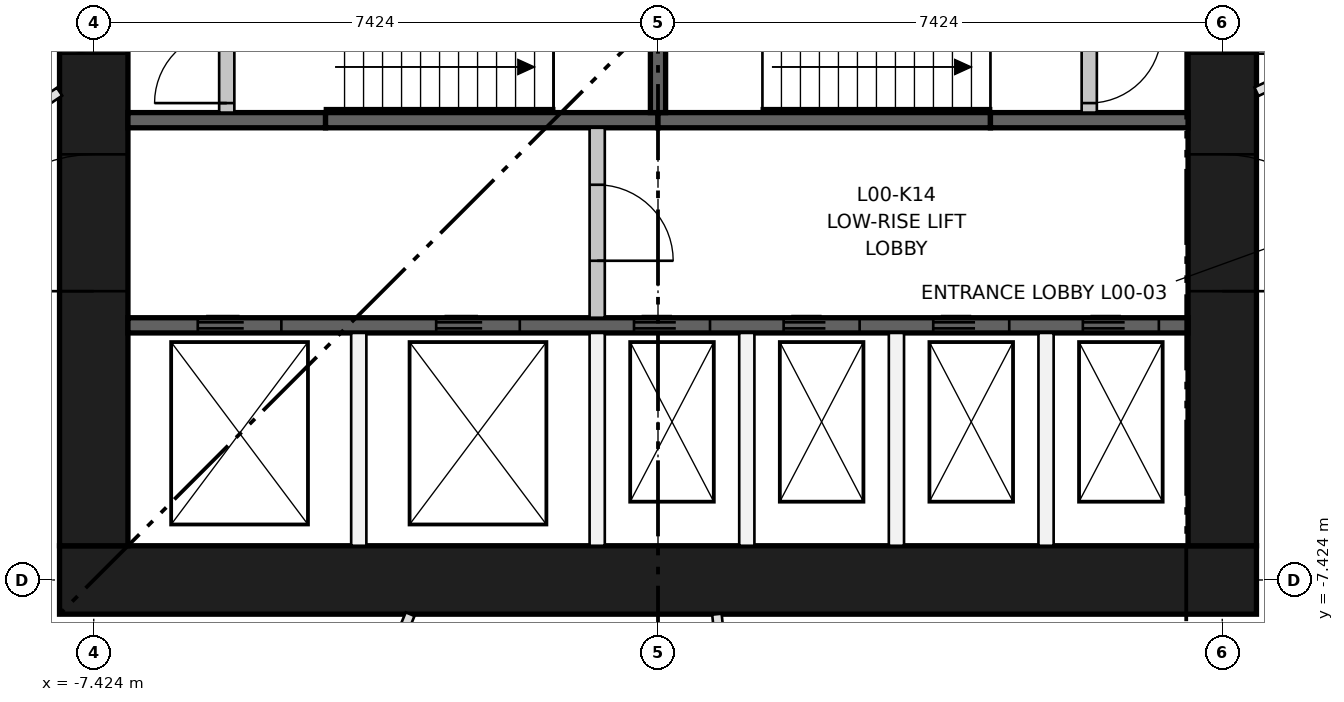
"""IFC4 building model, lengths in metres.
Left out: names, types, materials, properties, quantities, classifications, styles, units other than length and angle.
Written with IfcOpenShell. Run it as: python <this file> out.ifc"""

import sys

from ifc_helpers import new_model, si_unit, direction, frame, frame_2d, origin, place, context, subcontext, project, spatial, rectangle, extrude, element, fill, save


model = new_model("IFC4")
c1 = context("Model", 3, precision=1e-05, world=origin(), true_north=direction((0.0, 1.0)))
c2 = subcontext(c1, "Body", "Model", "MODEL_VIEW")
j1 = project(units=[si_unit("LENGTHUNIT", "METRE"), si_unit("PLANEANGLEUNIT", "RADIAN")], contexts=[c1])
p1 = place(None, origin())
s1 = spatial("IfcSite", under=j1, at=p1, CompositionType="ELEMENT")
p2 = place(p1, origin())
s2 = spatial("IfcBuilding", under=s1, at=p2, CompositionType="ELEMENT")
p3 = place(p2, origin())
s3 = spatial("IfcBuildingStorey", under=s2, at=p3, CompositionType="ELEMENT", Elevation=0.0)
p4 = place(p3, frame((-7.874, -7.424, -0.4), z_axis=(0.0, 0.0, 1.0), x_axis=(1.0, 0.0, 0.0)))
e1 = element("IfcWall", 1, at=p4, inside=s3, PredefinedType="SHEAR", context=c2, shape_type="SweptSolid", body=[
    extrude(rectangle(XDim=15.748, YDim=0.9, at=frame_2d((7.874, 0.0))), origin(), (0.0, 0.0, 1.0), 5.6),
])
p5 = place(p3, frame((-7.424, -6.974, -0.4), z_axis=(0.0, 0.0, 1.0), x_axis=(0.0, 1.0, 0.0)))
e2 = element("IfcWall", 2, at=p5, inside=s3, PredefinedType="SHEAR", context=c2, shape_type="SweptSolid", body=[
    extrude(rectangle(XDim=13.948, YDim=0.9, at=frame_2d((6.974, 0.0))), origin(), (0.0, 0.0, 1.0), 5.6),
])
p6 = place(p5, frame((6.474, 0.0, 0.4)))
e3 = element("IfcOpeningElement", 3, at=p6, cuts=e2, PredefinedType="OPENING", context=c2, shape_type="SweptSolid", body=[
    extrude(rectangle(XDim=1.0, YDim=2.1, at=frame_2d((0.5, 1.05))), frame((0.0, 0.46, 0.0), z_axis=(0.0, -1.0, 0.0), x_axis=(1.0, 0.0, 0.0)), (0.0, 0.0, 1.0), 0.92),
])
p7 = place(p5, frame((3.35, 0.0, 0.4)))
e4 = element("IfcOpeningElement", 4, at=p7, cuts=e2, PredefinedType="OPENING", context=c2, shape_type="SweptSolid", body=[
    extrude(rectangle(XDim=1.8, YDim=2.1, at=frame_2d((0.9, 1.05))), frame((0.0, 0.46, 0.0), z_axis=(0.0, -1.0, 0.0), x_axis=(1.0, 0.0, 0.0)), (0.0, 0.0, 1.0), 0.92),
])
p8 = place(p5, frame((8.799, 0.0, 0.4)))
e5 = element("IfcOpeningElement", 5, at=p8, cuts=e2, PredefinedType="OPENING", context=c2, shape_type="SweptSolid", body=[
    extrude(rectangle(XDim=1.8, YDim=2.1, at=frame_2d((0.9, 1.05))), frame((0.0, 0.46, 0.0), z_axis=(0.0, -1.0, 0.0), x_axis=(1.0, 0.0, 0.0)), (0.0, 0.0, 1.0), 0.92),
])
p9 = place(p5, frame((11.974, 0.0, 0.4)))
e6 = element("IfcOpeningElement", 6, at=p9, cuts=e2, PredefinedType="OPENING", context=c2, shape_type="SweptSolid", body=[
    extrude(rectangle(XDim=1.0, YDim=2.1, at=frame_2d((0.5, 1.05))), frame((0.0, 0.46, 0.0), z_axis=(0.0, -1.0, 0.0), x_axis=(1.0, 0.0, 0.0)), (0.0, 0.0, 1.0), 0.92),
])
p10 = place(p3, frame((7.424, -6.974, -0.4), z_axis=(0.0, 0.0, 1.0), x_axis=(0.0, 1.0, 0.0)))
e7 = element("IfcWall", 7, at=p10, inside=s3, PredefinedType="SHEAR", context=c2, shape_type="SweptSolid", body=[
    extrude(rectangle(XDim=13.948, YDim=0.9, at=frame_2d((6.974, 0.0))), origin(), (0.0, 0.0, 1.0), 5.6),
])
p11 = place(p10, frame((6.474, 0.0, 0.4)))
e8 = element("IfcOpeningElement", 8, at=p11, cuts=e7, PredefinedType="OPENING", context=c2, shape_type="SweptSolid", body=[
    extrude(rectangle(XDim=1.0, YDim=2.1, at=frame_2d((0.5, 1.05))), frame((0.0, 0.46, 0.0), z_axis=(0.0, -1.0, 0.0), x_axis=(1.0, 0.0, 0.0)), (0.0, 0.0, 1.0), 0.92),
])
p12 = place(p10, frame((3.35, 0.0, 0.4)))
e9 = element("IfcOpeningElement", 9, at=p12, cuts=e7, PredefinedType="OPENING", context=c2, shape_type="SweptSolid", body=[
    extrude(rectangle(XDim=1.8, YDim=2.1, at=frame_2d((0.9, 1.05))), frame((0.0, 0.46, 0.0), z_axis=(0.0, -1.0, 0.0), x_axis=(1.0, 0.0, 0.0)), (0.0, 0.0, 1.0), 0.92),
])
p13 = place(p10, frame((8.799, 0.0, 0.4)))
e10 = element("IfcOpeningElement", 10, at=p13, cuts=e7, PredefinedType="OPENING", context=c2, shape_type="SweptSolid", body=[
    extrude(rectangle(XDim=1.8, YDim=2.1, at=frame_2d((0.9, 1.05))), frame((0.0, 0.46, 0.0), z_axis=(0.0, -1.0, 0.0), x_axis=(1.0, 0.0, 0.0)), (0.0, 0.0, 1.0), 0.92),
])
p14 = place(p3, frame((-6.974, -4.074, 0.0), z_axis=(0.0, 0.0, 1.0), x_axis=(1.0, 0.0, 0.0)))
e11 = element("IfcWall", 11, at=p14, inside=s3, PredefinedType="SHEAR", context=c2, shape_type="SweptSolid", body=[
    extrude(rectangle(XDim=13.948, YDim=0.2, at=frame_2d((6.974, 0.0))), origin(), (0.0, 0.0, 1.0), 4.8),
])
p15 = place(p14, frame((0.918, 0.0, 0.0)))
e12 = element("IfcOpeningElement", 12, at=p15, cuts=e11, PredefinedType="OPENING", context=c2, shape_type="SweptSolid", body=[
    extrude(rectangle(XDim=1.1, YDim=2.1, at=frame_2d((0.55, 1.05))), frame((0.0, 0.11, 0.0), z_axis=(0.0, -1.0, 0.0), x_axis=(1.0, 0.0, 0.0)), (0.0, 0.0, 1.0), 0.22),
])
p16 = place(p14, frame((4.055, 0.0, 0.0)))
e13 = element("IfcOpeningElement", 13, at=p16, cuts=e11, PredefinedType="OPENING", context=c2, shape_type="SweptSolid", body=[
    extrude(rectangle(XDim=1.1, YDim=2.1, at=frame_2d((0.55, 1.05))), frame((0.0, 0.11, 0.0), z_axis=(0.0, -1.0, 0.0), x_axis=(1.0, 0.0, 0.0)), (0.0, 0.0, 1.0), 0.22),
])
p17 = place(p14, frame((6.658, 0.0, 0.0)))
e14 = element("IfcOpeningElement", 14, at=p17, cuts=e11, PredefinedType="OPENING", context=c2, shape_type="SweptSolid", body=[
    extrude(rectangle(XDim=1.0, YDim=2.1, at=frame_2d((0.5, 1.05))), frame((0.0, 0.11, 0.0), z_axis=(0.0, -1.0, 0.0), x_axis=(1.0, 0.0, 0.0)), (0.0, 0.0, 1.0), 0.22),
])
p18 = place(p14, frame((8.627, 0.0, 0.0)))
e15 = element("IfcOpeningElement", 15, at=p18, cuts=e11, PredefinedType="OPENING", context=c2, shape_type="SweptSolid", body=[
    extrude(rectangle(XDim=1.0, YDim=2.1, at=frame_2d((0.5, 1.05))), frame((0.0, 0.11, 0.0), z_axis=(0.0, -1.0, 0.0), x_axis=(1.0, 0.0, 0.0)), (0.0, 0.0, 1.0), 0.22),
])
p19 = place(p14, frame((10.595, 0.0, 0.0)))
e16 = element("IfcOpeningElement", 16, at=p19, cuts=e11, PredefinedType="OPENING", context=c2, shape_type="SweptSolid", body=[
    extrude(rectangle(XDim=1.0, YDim=2.1, at=frame_2d((0.5, 1.05))), frame((0.0, 0.11, 0.0), z_axis=(0.0, -1.0, 0.0), x_axis=(1.0, 0.0, 0.0)), (0.0, 0.0, 1.0), 0.22),
])
p20 = place(p14, frame((12.564, 0.0, 0.0)))
e17 = element("IfcOpeningElement", 17, at=p20, cuts=e11, PredefinedType="OPENING", context=c2, shape_type="SweptSolid", body=[
    extrude(rectangle(XDim=1.0, YDim=2.1, at=frame_2d((0.5, 1.05))), frame((0.0, 0.11, 0.0), z_axis=(0.0, -1.0, 0.0), x_axis=(1.0, 0.0, 0.0)), (0.0, 0.0, 1.0), 0.22),
])
p21 = place(p3, frame((-6.974, -1.375, 0.0), z_axis=(0.0, 0.0, 1.0), x_axis=(1.0, 0.0, 0.0)))
e18 = element("IfcWall", 18, at=p21, inside=s3, PredefinedType="SHEAR", context=c2, shape_type="SweptSolid", body=[
    extrude(rectangle(XDim=2.6, YDim=0.2, at=frame_2d((1.3, 0.0))), origin(), (0.0, 0.0, 1.0), 4.8),
])
for number, where, z_axis, x_axis in (
    (19, (-4.374, -1.375, 0.0), (0.0, 0.0, 1.0), (1.0, 0.0, 0.0)),
    (20, (0.0, -1.375, 0.0), (0.0, 0.0, 1.0), (1.0, 0.0, 0.0)),
):
    element("IfcWall", number, at=place(p3, frame(where, z_axis=z_axis, x_axis=x_axis)), inside=s3, PredefinedType="SHEAR", context=c2, shape_type="SweptSolid", body=[
        extrude(rectangle(XDim=4.374, YDim=0.2, at=frame_2d((2.187, 0.0))), origin(), (0.0, 0.0, 1.0), 4.8),
    ])
p22 = place(p3, frame((4.374, -1.375, 0.0), z_axis=(0.0, 0.0, 1.0), x_axis=(1.0, 0.0, 0.0)))
e21 = element("IfcWall", 21, at=p22, inside=s3, PredefinedType="SHEAR", context=c2, shape_type="SweptSolid", body=[
    extrude(rectangle(XDim=2.6, YDim=0.2, at=frame_2d((1.3, 0.0))), origin(), (0.0, 0.0, 1.0), 4.8),
])
p23 = place(p3, frame((0.0, -1.275, 0.0), z_axis=(0.0, 0.0, 1.0), x_axis=(0.0, 1.0, 0.0)))
e22 = element("IfcWall", 22, at=p23, inside=s3, PredefinedType="SHEAR", context=c2, shape_type="SweptSolid", body=[
    extrude(rectangle(XDim=2.55, YDim=0.2, at=frame_2d((1.275, 0.0))), origin(), (0.0, 0.0, 1.0), 4.8),
])
for number, where, z_axis, x_axis in (
    (23, (-3.937, -6.974, 0.0), (0.0, 0.0, 1.0), (0.0, 1.0, 0.0)),
    (24, (-0.8, -6.974, 0.0), (0.0, 0.0, 1.0), (0.0, 1.0, 0.0)),
):
    element("IfcWall", number, at=place(p3, frame(where, z_axis=z_axis, x_axis=x_axis)), inside=s3, PredefinedType="PARTITIONING", context=c2, shape_type="SweptSolid", body=[
        extrude(rectangle(XDim=2.8, YDim=0.2, at=frame_2d((1.4, 0.0))), origin(), (0.0, 0.0, 1.0), 4.8),
    ])
p24 = place(p3, frame((-0.8, -3.974, 0.0), z_axis=(0.0, 0.0, 1.0), x_axis=(0.0, 1.0, 0.0)))
e25 = element("IfcWall", 25, at=p24, inside=s3, PredefinedType="PARTITIONING", context=c2, shape_type="SweptSolid", body=[
    extrude(rectangle(XDim=2.499, YDim=0.2, at=frame_2d((1.25, 0.0))), origin(), (0.0, 0.0, 1.0), 4.8),
])
p25 = place(p24, frame((0.75, 0.0, 0.0)))
e26 = element("IfcOpeningElement", 26, at=p25, cuts=e25, PredefinedType="OPENING", context=c2, shape_type="SweptSolid", body=[
    extrude(rectangle(XDim=1.0, YDim=2.1, at=frame_2d((0.5, 1.05))), frame((0.0, 0.11, 0.0), z_axis=(0.0, -1.0, 0.0), x_axis=(1.0, 0.0, 0.0)), (0.0, 0.0, 1.0), 0.22),
])
for number, where, z_axis, x_axis in (
    (27, (1.168, -6.974, 0.0), (0.0, 0.0, 1.0), (0.0, 1.0, 0.0)),
    (28, (3.137, -6.974, 0.0), (0.0, 0.0, 1.0), (0.0, 1.0, 0.0)),
    (29, (5.105, -6.974, 0.0), (0.0, 0.0, 1.0), (0.0, 1.0, 0.0)),
):
    element("IfcWall", number, at=place(p3, frame(where, z_axis=z_axis, x_axis=x_axis)), inside=s3, PredefinedType="PARTITIONING", context=c2, shape_type="SweptSolid", body=[
        extrude(rectangle(XDim=2.8, YDim=0.2, at=frame_2d((1.4, 0.0))), origin(), (0.0, 0.0, 1.0), 4.8),
    ])
p26 = place(p3, frame((-5.674, -1.275, 0.0), z_axis=(0.0, 0.0, 1.0), x_axis=(0.0, 1.0, 0.0)))
e30 = element("IfcWall", 30, at=p26, inside=s3, PredefinedType="PARTITIONING", context=c2, shape_type="SweptSolid", body=[
    extrude(rectangle(XDim=2.55, YDim=0.2, at=frame_2d((1.275, 0.0))), origin(), (0.0, 0.0, 1.0), 4.8),
])
p27 = place(p26, frame((0.125, 0.0, 0.0)))
e31 = element("IfcOpeningElement", 31, at=p27, cuts=e30, PredefinedType="OPENING", context=c2, shape_type="SweptSolid", body=[
    extrude(rectangle(XDim=0.95, YDim=2.1, at=frame_2d((0.475, 1.05))), frame((0.0, 0.11, 0.0), z_axis=(0.0, -1.0, 0.0), x_axis=(1.0, 0.0, 0.0)), (0.0, 0.0, 1.0), 0.22),
])
p28 = place(p26, frame((1.475, 0.0, 0.0)))
e32 = element("IfcOpeningElement", 32, at=p28, cuts=e30, PredefinedType="OPENING", context=c2, shape_type="SweptSolid", body=[
    extrude(rectangle(XDim=0.95, YDim=2.1, at=frame_2d((0.475, 1.05))), frame((0.0, 0.11, 0.0), z_axis=(0.0, -1.0, 0.0), x_axis=(1.0, 0.0, 0.0)), (0.0, 0.0, 1.0), 0.22),
])
p29 = place(p3, frame((5.674, -1.275, 0.0), z_axis=(0.0, 0.0, 1.0), x_axis=(0.0, 1.0, 0.0)))
e33 = element("IfcWall", 33, at=p29, inside=s3, PredefinedType="PARTITIONING", context=c2, shape_type="SweptSolid", body=[
    extrude(rectangle(XDim=2.55, YDim=0.2, at=frame_2d((1.275, 0.0))), origin(), (0.0, 0.0, 1.0), 4.8),
])
p30 = place(p29, frame((0.125, 0.0, 0.0)))
e34 = element("IfcOpeningElement", 34, at=p30, cuts=e33, PredefinedType="OPENING", context=c2, shape_type="SweptSolid", body=[
    extrude(rectangle(XDim=0.95, YDim=2.1, at=frame_2d((0.475, 1.05))), frame((0.0, 0.11, 0.0), z_axis=(0.0, -1.0, 0.0), x_axis=(1.0, 0.0, 0.0)), (0.0, 0.0, 1.0), 0.22),
])
p31 = place(p29, frame((1.475, 0.0, 0.0)))
e35 = element("IfcOpeningElement", 35, at=p31, cuts=e33, PredefinedType="OPENING", context=c2, shape_type="SweptSolid", body=[
    extrude(rectangle(XDim=0.95, YDim=2.1, at=frame_2d((0.475, 1.05))), frame((0.0, 0.11, 0.0), z_axis=(0.0, -1.0, 0.0), x_axis=(1.0, 0.0, 0.0)), (0.0, 0.0, 1.0), 0.22),
])
p32 = place(p3, frame((-7.874, 1.0, 0.0), z_axis=(0.0, 0.0, 1.0), x_axis=(-0.90340417802, -0.428790031527, 0.0)))
e36 = element("IfcWall", 36, at=p32, inside=s3, PredefinedType="PARTITIONING", context=c2, shape_type="SweptSolid", body=[
    extrude(rectangle(XDim=4.816, YDim=0.125, at=frame_2d((2.408, 0.0))), origin(), (0.0, 0.0, 1.0), 4.8),
])
p33 = place(p32, frame((1.9, 0.0, 0.0)))
e37 = element("IfcOpeningElement", 37, at=p33, cuts=e36, PredefinedType="OPENING", context=c2, shape_type="SweptSolid", body=[
    extrude(rectangle(XDim=1.0, YDim=2.1, at=frame_2d((0.5, 1.05))), frame((0.0, 0.073, 0.0), z_axis=(0.0, -1.0, 0.0), x_axis=(1.0, 0.0, 0.0)), (0.0, 0.0, 1.0), 0.145),
])
p34 = place(p3, frame((-11.723, -3.589, 0.0), z_axis=(0.0, 0.0, 1.0), x_axis=(0.829735405584, 0.5581569284, 0.0)))
e38 = element("IfcWall", 38, at=p34, inside=s3, PredefinedType="PARTITIONING", context=c2, shape_type="SweptSolid", body=[
    extrude(rectangle(XDim=4.639, YDim=0.125, at=frame_2d((2.319, 0.0))), origin(), (0.0, 0.0, 1.0), 4.8),
])
p35 = place(p3, frame((-3.261, -7.874, 0.0), z_axis=(0.0, 0.0, 1.0), x_axis=(-0.382719033385, -0.923864785283, 0.0)))
e39 = element("IfcWall", 39, at=p35, inside=s3, PredefinedType="PARTITIONING", context=c2, shape_type="SweptSolid", body=[
    extrude(rectangle(XDim=3.914, YDim=0.125, at=frame_2d((1.957, 0.0))), origin(), (0.0, 0.0, 1.0), 4.8),
])
p36 = place(p3, frame((7.874, -1.0, 0.0), z_axis=(0.0, 0.0, 1.0), x_axis=(0.90340417802, 0.428790031527, 0.0)))
e40 = element("IfcWall", 40, at=p36, inside=s3, PredefinedType="PARTITIONING", context=c2, shape_type="SweptSolid", body=[
    extrude(rectangle(XDim=4.816, YDim=0.125, at=frame_2d((2.408, 0.0))), origin(), (0.0, 0.0, 1.0), 4.8),
])
p37 = place(p36, frame((1.9, 0.0, 0.0)))
e41 = element("IfcOpeningElement", 41, at=p37, cuts=e40, PredefinedType="OPENING", context=c2, shape_type="SweptSolid", body=[
    extrude(rectangle(XDim=1.0, YDim=2.1, at=frame_2d((0.5, 1.05))), frame((0.0, 0.073, 0.0), z_axis=(0.0, -1.0, 0.0), x_axis=(1.0, 0.0, 0.0)), (0.0, 0.0, 1.0), 0.145),
])
p38 = place(p3, frame((1.201, -12.198, 0.0), z_axis=(0.0, 0.0, 1.0), x_axis=(-0.098051574103, 0.99518133464, 0.0)))
e42 = element("IfcWall", 42, at=p38, inside=s3, PredefinedType="PARTITIONING", context=c2, shape_type="SweptSolid", body=[
    extrude(rectangle(XDim=4.345, YDim=0.125, at=frame_2d((2.172, 0.0))), origin(), (0.0, 0.0, 1.0), 4.8),
])
p39 = place(p38, frame((1.7, 0.0, 0.0)))
e43 = element("IfcOpeningElement", 43, at=p39, cuts=e42, PredefinedType="OPENING", context=c2, shape_type="SweptSolid", body=[
    extrude(rectangle(XDim=1.0, YDim=2.1, at=frame_2d((0.5, 1.05))), frame((0.0, 0.073, 0.0), z_axis=(0.0, -1.0, 0.0), x_axis=(1.0, 0.0, 0.0)), (0.0, 0.0, 1.0), 0.145),
])
p40 = place(p15, origin())
e44 = element("IfcDoor", 44, at=p40, inside=s3, OperationType="DOUBLE_DOOR_SLIDING", PredefinedType="DOOR", context=c2, shape_type="SweptSolid", body=[
    extrude(rectangle(XDim=1.1, YDim=2.1, at=frame_2d((0.55, 1.05))), frame((0.0, 0.025, 0.0), z_axis=(0.0, -1.0, 0.0), x_axis=(1.0, 0.0, 0.0)), (0.0, 0.0, 1.0), 0.05),
])
fill(e12, e44)
p41 = place(p16, origin())
e45 = element("IfcDoor", 45, at=p41, inside=s3, OperationType="DOUBLE_DOOR_SLIDING", PredefinedType="DOOR", context=c2, shape_type="SweptSolid", body=[
    extrude(rectangle(XDim=1.1, YDim=2.1, at=frame_2d((0.55, 1.05))), frame((0.0, 0.025, 0.0), z_axis=(0.0, -1.0, 0.0), x_axis=(1.0, 0.0, 0.0)), (0.0, 0.0, 1.0), 0.05),
])
fill(e13, e45)
p42 = place(p17, origin())
e46 = element("IfcDoor", 46, at=p42, inside=s3, OperationType="DOUBLE_DOOR_SLIDING", PredefinedType="DOOR", context=c2, shape_type="SweptSolid", body=[
    extrude(rectangle(XDim=1.0, YDim=2.1, at=frame_2d((0.5, 1.05))), frame((0.0, 0.025, 0.0), z_axis=(0.0, -1.0, 0.0), x_axis=(1.0, 0.0, 0.0)), (0.0, 0.0, 1.0), 0.05),
])
fill(e14, e46)
p43 = place(p18, origin())
e47 = element("IfcDoor", 47, at=p43, inside=s3, OperationType="DOUBLE_DOOR_SLIDING", PredefinedType="DOOR", context=c2, shape_type="SweptSolid", body=[
    extrude(rectangle(XDim=1.0, YDim=2.1, at=frame_2d((0.5, 1.05))), frame((0.0, 0.025, 0.0), z_axis=(0.0, -1.0, 0.0), x_axis=(1.0, 0.0, 0.0)), (0.0, 0.0, 1.0), 0.05),
])
fill(e15, e47)
p44 = place(p19, origin())
e48 = element("IfcDoor", 48, at=p44, inside=s3, OperationType="DOUBLE_DOOR_SLIDING", PredefinedType="DOOR", context=c2, shape_type="SweptSolid", body=[
    extrude(rectangle(XDim=1.0, YDim=2.1, at=frame_2d((0.5, 1.05))), frame((0.0, 0.025, 0.0), z_axis=(0.0, -1.0, 0.0), x_axis=(1.0, 0.0, 0.0)), (0.0, 0.0, 1.0), 0.05),
])
fill(e16, e48)
p45 = place(p20, origin())
e49 = element("IfcDoor", 49, at=p45, inside=s3, OperationType="DOUBLE_DOOR_SLIDING", PredefinedType="DOOR", context=c2, shape_type="SweptSolid", body=[
    extrude(rectangle(XDim=1.0, YDim=2.1, at=frame_2d((0.5, 1.05))), frame((0.0, 0.025, 0.0), z_axis=(0.0, -1.0, 0.0), x_axis=(1.0, 0.0, 0.0)), (0.0, 0.0, 1.0), 0.05),
])
fill(e17, e49)
p46 = place(p27, origin())
e50 = element("IfcDoor", 50, at=p46, inside=s3, OperationType="SINGLE_SWING_LEFT", PredefinedType="DOOR", context=c2, shape_type="SweptSolid", body=[
    extrude(rectangle(XDim=0.95, YDim=2.1, at=frame_2d((0.475, 1.05))), frame((0.0, 0.025, 0.0), z_axis=(0.0, -1.0, 0.0), x_axis=(1.0, 0.0, 0.0)), (0.0, 0.0, 1.0), 0.05),
])
fill(e31, e50)
p47 = place(p30, frame((0.95, 0.0, 0.0), z_axis=(0.0, 0.0, 1.0), x_axis=(-1.0, 0.0, 0.0)))
e51 = element("IfcDoor", 51, at=p47, inside=s3, OperationType="SINGLE_SWING_RIGHT", PredefinedType="DOOR", context=c2, shape_type="SweptSolid", body=[
    extrude(rectangle(XDim=0.95, YDim=2.1, at=frame_2d((0.475, 1.05))), frame((0.0, 0.025, 0.0), z_axis=(0.0, -1.0, 0.0), x_axis=(1.0, 0.0, 0.0)), (0.0, 0.0, 1.0), 0.05),
])
fill(e34, e51)
p48 = place(p25, frame((1.0, 0.0, 0.0), z_axis=(0.0, 0.0, 1.0), x_axis=(-1.0, 0.0, 0.0)))
e52 = element("IfcDoor", 52, at=p48, inside=s3, OperationType="SINGLE_SWING_LEFT", PredefinedType="DOOR", context=c2, shape_type="SweptSolid", body=[
    extrude(rectangle(XDim=1.0, YDim=2.1, at=frame_2d((0.5, 1.05))), frame((0.0, 0.025, 0.0), z_axis=(0.0, -1.0, 0.0), x_axis=(1.0, 0.0, 0.0)), (0.0, 0.0, 1.0), 0.05),
])
fill(e26, e52)
p49 = place(p6, origin())
e53 = element("IfcDoor", 53, at=p49, inside=s3, OperationType="SINGLE_SWING_RIGHT", PredefinedType="DOOR", context=c2, shape_type="SweptSolid", body=[
    extrude(rectangle(XDim=1.0, YDim=2.1, at=frame_2d((0.5, 1.05))), frame((0.0, 0.025, 0.0), z_axis=(0.0, -1.0, 0.0), x_axis=(1.0, 0.0, 0.0)), (0.0, 0.0, 1.0), 0.05),
])
fill(e3, e53)
p50 = place(p7, origin())
e54 = element("IfcDoor", 54, at=p50, inside=s3, OperationType="DOUBLE_DOOR_SINGLE_SWING", PredefinedType="DOOR", context=c2, shape_type="SweptSolid", body=[
    extrude(rectangle(XDim=1.8, YDim=2.1, at=frame_2d((0.9, 1.05))), frame((0.0, 0.025, 0.0), z_axis=(0.0, -1.0, 0.0), x_axis=(1.0, 0.0, 0.0)), (0.0, 0.0, 1.0), 0.05),
])
fill(e4, e54)
p51 = place(p11, frame((1.0, 0.0, 0.0), z_axis=(0.0, 0.0, 1.0), x_axis=(-1.0, 0.0, 0.0)))
e55 = element("IfcDoor", 55, at=p51, inside=s3, OperationType="SINGLE_SWING_LEFT", PredefinedType="DOOR", context=c2, shape_type="SweptSolid", body=[
    extrude(rectangle(XDim=1.0, YDim=2.1, at=frame_2d((0.5, 1.05))), frame((0.0, 0.025, 0.0), z_axis=(0.0, -1.0, 0.0), x_axis=(1.0, 0.0, 0.0)), (0.0, 0.0, 1.0), 0.05),
])
fill(e8, e55)
p52 = place(p12, frame((1.8, 0.0, 0.0), z_axis=(0.0, 0.0, 1.0), x_axis=(-1.0, 0.0, 0.0)))
e56 = element("IfcDoor", 56, at=p52, inside=s3, OperationType="DOUBLE_DOOR_SINGLE_SWING", PredefinedType="DOOR", context=c2, shape_type="SweptSolid", body=[
    extrude(rectangle(XDim=1.8, YDim=2.1, at=frame_2d((0.9, 1.05))), frame((0.0, 0.025, 0.0), z_axis=(0.0, -1.0, 0.0), x_axis=(1.0, 0.0, 0.0)), (0.0, 0.0, 1.0), 0.05),
])
fill(e9, e56)
save(model, sys.argv[1])
